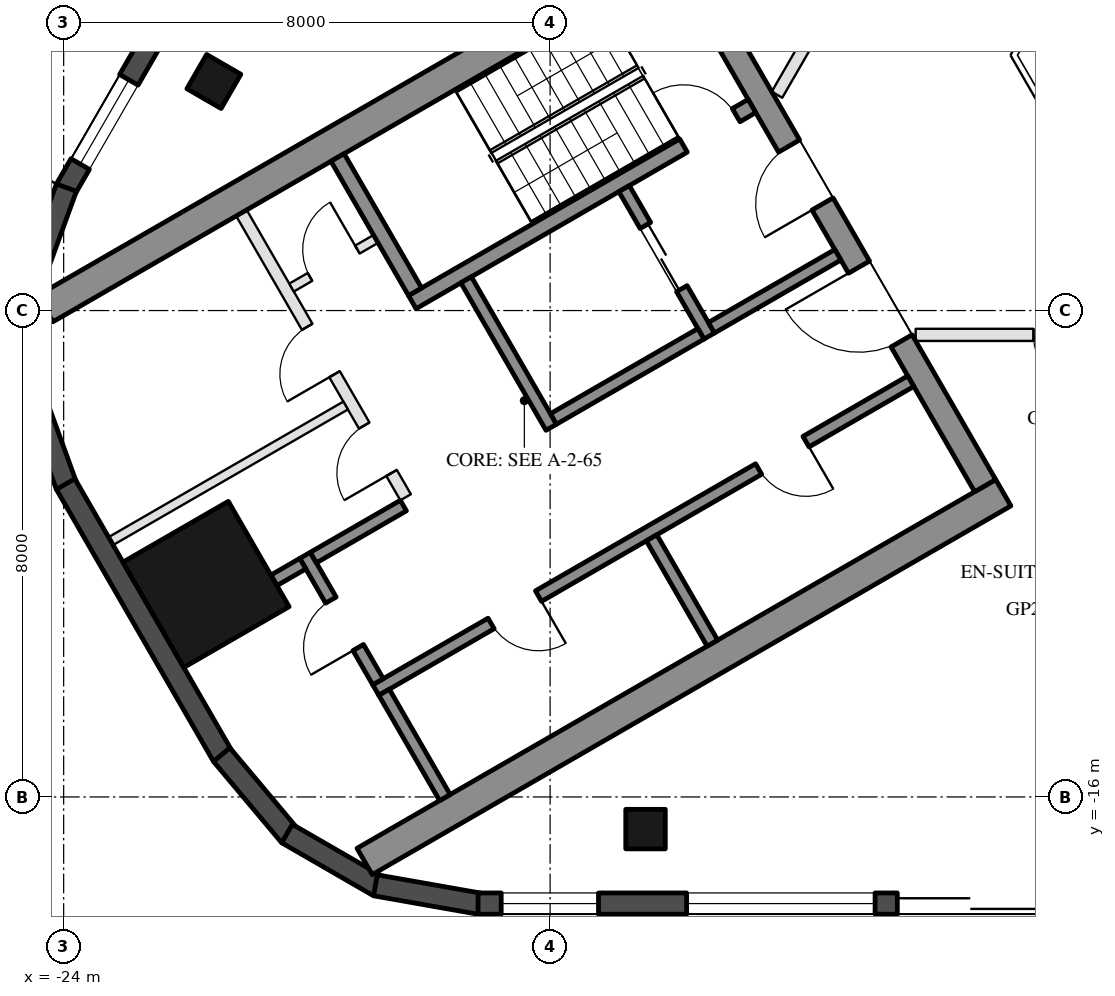
"""IFC4 building model, lengths in metres.
Left out: names, types, materials, properties, quantities, classifications, styles, units other than length and angle.
Written with IfcOpenShell. Run it as: python <this file> out.ifc"""

import sys

from ifc_helpers import new_model, si_unit, direction, frame, frame_2d, origin, origin_2d, place, context, subcontext, project, spatial, rectangle, hollow_rectangle, extrude, boolean, halfspace, element, fill, save


model = new_model("IFC4")
c1 = context("Model", 3, precision=1e-05, world=origin(), true_north=direction((0.0, 1.0)))
c2 = subcontext(c1, "Body", "Model", "MODEL_VIEW")
j1 = project(units=[si_unit("LENGTHUNIT", "METRE"), si_unit("PLANEANGLEUNIT", "RADIAN")], contexts=[c1])
p1 = place(None, origin())
s1 = spatial("IfcSite", under=j1, at=p1, CompositionType="ELEMENT")
p2 = place(p1, origin())
s2 = spatial("IfcBuilding", under=s1, at=p2, CompositionType="ELEMENT")
p3 = place(p2, frame((0.0, 0.0, 280.0)))
s3 = spatial("IfcBuildingStorey", under=s2, at=p3, CompositionType="ELEMENT", Elevation=280.0)
for number, where, z_axis, x_axis in (
    (1, (-14.431, -16.529, 0.0), (0.0, 0.0, 1.0), (-1.0, 0.0, 0.0)),
    (2, (-21.53, -4.233, 0.0), (0.0, 0.0, 1.0), (0.5, 0.866, 0.0)),
):
    element("IfcColumn", number, at=place(p3, frame(where, z_axis=z_axis, x_axis=x_axis)), inside=s3, PredefinedType="COLUMN", context=c2, shape_type="SweptSolid", body=[
        boolean("DIFFERENCE", extrude(hollow_rectangle(XDim=0.65, YDim=0.65, WallThickness=0.03, at=origin_2d()), origin(), (0.0, 0.0, 1.0), 3.7), halfspace(frame((0.0, 0.0, 0.047), z_axis=(0.0, 0.0, 1.0), x_axis=(1.0, 0.0, 0.0)), True)),
    ])
p4 = place(p3, frame((-21.658, -12.504, 0.0), z_axis=(0.0, 0.0, 1.0), x_axis=(-0.5, 0.866025403784, 0.0)))
e3 = element("IfcColumn", 3, at=p4, inside=s3, PredefinedType="COLUMN", context=c2, shape_type="SweptSolid", body=[
    boolean("DIFFERENCE", extrude(hollow_rectangle(XDim=2.0, YDim=2.0, WallThickness=0.05, at=origin_2d()), origin(), (0.0, 0.0, 1.0), 3.7), halfspace(frame((0.0, 0.0, 0.113), z_axis=(0.0, 0.0, 1.0), x_axis=(1.0, 0.0, 0.0)), True)),
])
p5 = place(p3, frame((-22.14, -2.841, 0.0), z_axis=(0.0, 0.0, 1.0), x_axis=(-0.500040506767, -0.866002015928, 0.0)))
e4 = element("IfcWall", 4, at=p5, inside=s3, PredefinedType="SOLIDWALL", context=c2, shape_type="SweptSolid", body=[
    extrude(rectangle(XDim=3.655, YDim=0.35, at=frame_2d((1.827, 0.0))), origin(), (0.0, 0.0, 1.0), 3.55),
])
p6 = place(p5, frame((1.575, 0.0, 0.3)))
e5 = element("IfcOpeningElement", 5, at=p6, cuts=e4, PredefinedType="OPENING", context=c2, shape_type="SweptSolid", body=[
    extrude(rectangle(XDim=1.6, YDim=2.65, at=frame_2d((0.8, 1.325))), frame((0.0, 0.185, 0.0), z_axis=(0.0, -1.0, 0.0), x_axis=(1.0, 0.0, 0.0)), (0.0, 0.0, 1.0), 0.37),
])
for number, where, z_axis, x_axis in (
    (6, (-23.955, -5.978, 0.0), (0.0, 0.0, 1.0), (-0.342, -0.94, 0.0)),
    (7, (-24.552, -9.242, 0.0), (0.0, 0.0, 1.0), (0.342, -0.94, 0.0)),
):
    element("IfcWall", number, at=place(p3, frame(where, z_axis=z_axis, x_axis=x_axis)), inside=s3, PredefinedType="SOLIDWALL", context=c2, shape_type="SweptSolid", body=[
        extrude(rectangle(XDim=1.745, YDim=0.35, at=frame_2d((0.872, 0.0))), origin(), (0.0, 0.0, 1.0), 3.55),
    ])
p7 = place(p3, frame((-23.968, -10.854, 0.0), z_axis=(0.0, 0.0, 1.0), x_axis=(0.500020983425, -0.866013288659, 0.0)))
e8 = element("IfcWall", 8, at=p7, inside=s3, PredefinedType="SOLIDWALL", context=c2, shape_type="SweptSolid", body=[
    extrude(rectangle(XDim=5.168, YDim=0.35, at=frame_2d((2.584, 0.0))), origin(), (0.0, 0.0, 1.0), 3.55),
])
for number, where, z_axis, x_axis in (
    (9, (-21.401, -15.305, 0.0), (0.0, 0.0, 1.0), (0.643, -0.766, 0.0)),
    (10, (-20.327, -16.602, 0.0), (0.0, 0.0, 1.0), (0.866, -0.5, 0.0)),
    (11, (-18.873, -17.453, 0.0), (0.0, 0.0, 1.0), (0.985, -0.174, 0.0)),
):
    element("IfcWall", number, at=place(p3, frame(where, z_axis=z_axis, x_axis=x_axis)), inside=s3, PredefinedType="SOLIDWALL", context=c2, shape_type="SweptSolid", body=[
        extrude(rectangle(XDim=1.745, YDim=0.35, at=frame_2d((0.872, 0.0))), origin(), (0.0, 0.0, 1.0), 3.55),
    ])
p8 = place(p3, frame((-17.185, -17.754, 0.0), z_axis=(0.0, 0.0, 1.0), x_axis=(1.0, 0.0, 0.0)))
e12 = element("IfcWall", 12, at=p8, inside=s3, PredefinedType="SOLIDWALL", context=c2, shape_type="SweptSolid", body=[
    extrude(rectangle(XDim=10.87, YDim=0.35, at=frame_2d((5.435, 0.0))), origin(), (0.0, 0.0, 1.0), 3.55),
])
p9 = place(p8, frame((0.381, 0.0, 0.3)))
e13 = element("IfcOpeningElement", 13, at=p9, cuts=e12, PredefinedType="OPENING", context=c2, shape_type="SweptSolid", body=[
    extrude(rectangle(XDim=1.6, YDim=2.65, at=frame_2d((0.8, 1.325))), frame((0.0, 0.185, 0.0), z_axis=(0.0, -1.0, 0.0), x_axis=(1.0, 0.0, 0.0)), (0.0, 0.0, 1.0), 0.37),
])
p10 = place(p8, frame((6.895, 0.0, 0.0)))
e14 = element("IfcOpeningElement", 14, at=p10, cuts=e12, PredefinedType="OPENING", context=c2, shape_type="SweptSolid", body=[
    extrude(rectangle(XDim=2.4, YDim=2.4, at=frame_2d((1.2, 1.2))), frame((0.0, 0.185, 0.0), z_axis=(0.0, -1.0, 0.0), x_axis=(1.0, 0.0, 0.0)), (0.0, 0.0, 1.0), 0.37),
])
p11 = place(p8, frame((3.43, 0.0, 0.3)))
e15 = element("IfcOpeningElement", 15, at=p11, cuts=e12, PredefinedType="OPENING", context=c2, shape_type="SweptSolid", body=[
    extrude(rectangle(XDim=3.1, YDim=2.65, at=frame_2d((1.55, 1.325))), frame((0.0, 0.185, 0.0), z_axis=(0.0, -1.0, 0.0), x_axis=(1.0, 0.0, 0.0)), (0.0, 0.0, 1.0), 0.37),
])
for number, where, z_axis, x_axis in (
    (16, (-13.797, -1.903, 0.0), (0.0, 0.0, 1.0), (-0.866, -0.5, 0.0)),
    (17, (-8.547, -10.997, 0.0), (0.0, 0.0, 1.0), (-0.866, -0.5, 0.0)),
):
    element("IfcWall", number, at=place(p3, frame(where, z_axis=z_axis, x_axis=x_axis)), inside=s3, PredefinedType="SHEAR", context=c2, shape_type="SweptSolid", body=[
        extrude(rectangle(XDim=12.129, YDim=0.5, at=frame_2d((6.064, 0.0))), origin(), (0.0, 0.0, 1.0), 3.5),
    ])
p12 = place(p3, frame((-13.845, -2.22, 0.0), z_axis=(0.0, 0.0, 1.0), x_axis=(0.500004234368, -0.866022959057, 0.0)))
e18 = element("IfcWall", 18, at=p12, inside=s3, PredefinedType="SHEAR", context=c2, shape_type="SweptSolid", body=[
    extrude(rectangle(XDim=10.0, YDim=0.4, at=frame_2d((5.0, 0.0))), origin(), (0.0, 0.0, 1.0), 3.5),
])
p13 = place(p12, frame((3.55, 0.0, 0.0)))
e19 = element("IfcOpeningElement", 19, at=p13, cuts=e18, PredefinedType="OPENING", context=c2, shape_type="SweptSolid", body=[
    extrude(rectangle(XDim=1.1, YDim=2.1, at=frame_2d((0.55, 1.05))), frame((0.0, 0.21, 0.0), z_axis=(0.0, -1.0, 0.0), x_axis=(1.0, 0.0, 0.0)), (0.0, 0.0, 1.0), 0.42),
])
p14 = place(p12, frame((5.85, 0.0, 0.0)))
e20 = element("IfcOpeningElement", 20, at=p14, cuts=e18, PredefinedType="OPENING", context=c2, shape_type="SweptSolid", body=[
    extrude(rectangle(XDim=1.4, YDim=2.1, at=frame_2d((0.7, 1.05))), frame((0.0, 0.21, 0.0), z_axis=(0.0, -1.0, 0.0), x_axis=(1.0, 0.0, 0.0)), (0.0, 0.0, 1.0), 0.42),
])
p15 = place(p3, frame((-12.681, -4.636, 0.0), z_axis=(0.0, 0.0, 1.0), x_axis=(-0.866021702275, -0.500006411147, 0.0)))
e21 = element("IfcWall", 21, at=p15, inside=s3, PredefinedType="SHEAR", context=c2, shape_type="SweptSolid", body=[
    extrude(rectangle(XDim=6.45, YDim=0.25, at=frame_2d((3.225, 0.0))), origin(), (0.0, 0.0, 1.0), 3.5),
])
p16 = place(p15, frame((0.3, 0.0, 0.0)))
e22 = element("IfcOpeningElement", 22, at=p16, cuts=e21, PredefinedType="OPENING", context=c2, shape_type="SweptSolid", body=[
    extrude(rectangle(XDim=1.0, YDim=2.1, at=frame_2d((0.5, 1.05))), frame((0.0, 0.135, 0.0), z_axis=(0.0, -1.0, 0.0), x_axis=(1.0, 0.0, 0.0)), (0.0, 0.0, 1.0), 0.27),
])
p17 = place(p3, frame((-19.496, -5.482, 0.0), z_axis=(0.0, 0.0, 1.0), x_axis=(0.499990435942, -0.866030925526, 0.0)))
e23 = element("IfcWall", 23, at=p17, inside=s3, PredefinedType="SHEAR", context=c2, shape_type="SweptSolid", body=[
    extrude(rectangle(XDim=2.55, YDim=0.25, at=frame_2d((1.275, 0.0))), origin(), (0.0, 0.0, 1.0), 3.5),
])
p18 = place(p3, frame((-17.381, -7.495, 0.0), z_axis=(0.0, 0.0, 1.0), x_axis=(0.500011755427, -0.866018616679, 0.0)))
e24 = element("IfcWall", 24, at=p18, inside=s3, PredefinedType="SHEAR", context=c2, shape_type="SweptSolid", body=[
    extrude(rectangle(XDim=2.8, YDim=0.2, at=frame_2d((1.4, 0.0))), origin(), (0.0, 0.0, 1.0), 3.5),
])
p19 = place(p3, frame((-14.783, -5.995, 0.0), z_axis=(0.0, 0.0, 1.0), x_axis=(0.49994636267, -0.866056369097, 0.0)))
e25 = element("IfcWall", 25, at=p19, inside=s3, PredefinedType="SHEAR", context=c2, shape_type="SweptSolid", body=[
    extrude(rectangle(XDim=2.8, YDim=0.2, at=frame_2d((1.4, 0.0))), origin(), (0.0, 0.0, 1.0), 3.5),
])
p20 = place(p19, frame((0.7, 0.0, 0.0)))
e26 = element("IfcOpeningElement", 26, at=p20, cuts=e25, PredefinedType="OPENING", context=c2, shape_type="SweptSolid", body=[
    extrude(rectangle(XDim=1.2, YDim=2.1, at=frame_2d((0.6, 1.05))), frame((0.0, 0.11, 0.0), z_axis=(0.0, -1.0, 0.0), x_axis=(1.0, 0.0, 0.0)), (0.0, 0.0, 1.0), 0.22),
])
p21 = place(p3, frame((-13.52, -8.383, 0.0), z_axis=(0.0, 0.0, 1.0), x_axis=(-0.866034573852, -0.49998411664, 0.0)))
e27 = element("IfcWall", 27, at=p21, inside=s3, PredefinedType="SHEAR", context=c2, shape_type="SweptSolid", body=[
    extrude(rectangle(XDim=2.8, YDim=0.2, at=frame_2d((1.4, 0.0))), origin(), (0.0, 0.0, 1.0), 3.5),
])
p22 = place(p3, frame((-11.268, -7.083, 0.0), z_axis=(0.0, 0.0, 1.0), x_axis=(-0.866050077142, -0.499957262057, 0.0)))
e28 = element("IfcWall", 28, at=p22, inside=s3, PredefinedType="SHEAR", context=c2, shape_type="SweptSolid", body=[
    extrude(rectangle(XDim=2.4, YDim=0.2, at=frame_2d((1.2, 0.0))), origin(), (0.0, 0.0, 1.0), 3.5),
])
p23 = place(p3, frame((-10.068, -9.162, 0.0), z_axis=(0.0, 0.0, 1.0), x_axis=(-0.866032725843, -0.499987317609, 0.0)))
e29 = element("IfcWall", 29, at=p23, inside=s3, PredefinedType="SHEAR", context=c2, shape_type="SweptSolid", body=[
    extrude(rectangle(XDim=10.16, YDim=0.2, at=frame_2d((5.08, 0.0))), origin(), (0.0, 0.0, 1.0), 3.5),
])
p24 = place(p23, frame((1.99, 0.0, 0.0)))
e30 = element("IfcOpeningElement", 30, at=p24, cuts=e29, PredefinedType="OPENING", context=c2, shape_type="SweptSolid", body=[
    extrude(rectangle(XDim=0.9, YDim=2.1, at=frame_2d((0.45, 1.05))), frame((0.0, 0.11, 0.0), z_axis=(0.0, -1.0, 0.0), x_axis=(1.0, 0.0, 0.0)), (0.0, 0.0, 1.0), 0.22),
])
p25 = place(p23, frame((7.07, 0.0, 0.0)))
e31 = element("IfcOpeningElement", 31, at=p25, cuts=e29, PredefinedType="OPENING", context=c2, shape_type="SweptSolid", body=[
    extrude(rectangle(XDim=0.9, YDim=2.1, at=frame_2d((0.45, 1.05))), frame((0.0, 0.11, 0.0), z_axis=(0.0, -1.0, 0.0), x_axis=(1.0, 0.0, 0.0)), (0.0, 0.0, 1.0), 0.22),
])
p26 = place(p3, frame((-20.031, -12.026, 0.0), z_axis=(0.0, 0.0, 1.0), x_axis=(0.500033551112, -0.866006032174, 0.0)))
e32 = element("IfcWall", 32, at=p26, inside=s3, PredefinedType="SHEAR", context=c2, shape_type="SweptSolid", body=[
    extrude(rectangle(XDim=2.4, YDim=0.2, at=frame_2d((1.2, 0.0))), origin(), (0.0, 0.0, 1.0), 3.5),
])
p27 = place(p26, frame((0.85, 0.0, 0.0)))
e33 = element("IfcOpeningElement", 33, at=p27, cuts=e32, PredefinedType="OPENING", context=c2, shape_type="SweptSolid", body=[
    extrude(rectangle(XDim=0.9, YDim=2.1, at=frame_2d((0.45, 1.05))), frame((0.0, 0.11, 0.0), z_axis=(0.0, -1.0, 0.0), x_axis=(1.0, 0.0, 0.0)), (0.0, 0.0, 1.0), 0.22),
])
p28 = place(p3, frame((-18.413, -11.208, 0.0), z_axis=(0.0, 0.0, 1.0), x_axis=(-0.866038183914, -0.499977863513, 0.0)))
e34 = element("IfcWall", 34, at=p28, inside=s3, PredefinedType="SHEAR", context=c2, shape_type="SweptSolid", body=[
    extrude(rectangle(XDim=1.71, YDim=0.2, at=frame_2d((0.855, 0.0))), origin(), (0.0, 0.0, 1.0), 3.5),
])
for number, where, z_axis, x_axis in (
    (35, (-14.331, -11.738, 0.0), (0.0, 0.0, 1.0), (0.5, -0.866, 0.0)),
    (36, (-18.73, -14.278, 0.0), (0.0, 0.0, 1.0), (0.5, -0.866, 0.0)),
):
    element("IfcWall", number, at=place(p3, frame(where, z_axis=z_axis, x_axis=x_axis)), inside=s3, PredefinedType="SHEAR", context=c2, shape_type="SweptSolid", body=[
        extrude(rectangle(XDim=2.0, YDim=0.2, at=frame_2d((1.0, 0.0))), origin(), (0.0, 0.0, 1.0), 3.5),
    ])
p29 = place(p3, frame((-20.067, -12.163, 0.0), z_axis=(0.0, 0.0, 1.0), x_axis=(-0.866044851585, -0.499966313909, 0.0)))
e37 = element("IfcWall", 37, at=p29, inside=s3, PredefinedType="SHEAR", context=c2, shape_type="SweptSolid", body=[
    extrude(rectangle(XDim=0.549, YDim=0.2, at=frame_2d((0.274, 0.0))), origin(), (0.0, 0.0, 1.0), 3.5),
])
p30 = place(p3, frame((-21.076, -6.395, 0.0), z_axis=(0.0, 0.0, 1.0), x_axis=(0.50001468107, -0.866016927499, 0.0)))
e38 = element("IfcWall", 38, at=p30, inside=s3, PredefinedType="PARTITIONING", context=c2, shape_type="SweptSolid", body=[
    extrude(rectangle(XDim=5.4, YDim=0.2, at=frame_2d((2.7, 0.0))), origin(), (0.0, 0.0, 1.0), 3.5),
])
p31 = place(p30, frame((2.163, 0.0, 0.0)))
e39 = element("IfcOpeningElement", 39, at=p31, cuts=e38, PredefinedType="OPENING", context=c2, shape_type="SweptSolid", body=[
    extrude(rectangle(XDim=0.9, YDim=2.1, at=frame_2d((0.45, 1.05))), frame((0.0, 0.11, 0.0), z_axis=(0.0, -1.0, 0.0), x_axis=(1.0, 0.0, 0.0)), (0.0, 0.0, 1.0), 0.22),
])
p32 = place(p30, frame((4.038, 0.0, 0.0)))
e40 = element("IfcOpeningElement", 40, at=p32, cuts=e38, PredefinedType="OPENING", context=c2, shape_type="SweptSolid", body=[
    extrude(rectangle(XDim=0.9, YDim=2.1, at=frame_2d((0.45, 1.05))), frame((0.0, 0.11, 0.0), z_axis=(0.0, -1.0, 0.0), x_axis=(1.0, 0.0, 0.0)), (0.0, 0.0, 1.0), 0.22),
])
p33 = place(p3, frame((-18.866, -6.822, 0.0), z_axis=(0.0, 0.0, 1.0), x_axis=(-0.866028054938, -0.499995408039, 0.0)))
e41 = element("IfcWall", 41, at=p33, inside=s3, PredefinedType="PARTITIONING", context=c2, shape_type="SweptSolid", body=[
    extrude(rectangle(XDim=1.6, YDim=0.15, at=frame_2d((0.8, 0.0))), origin(), (0.0, 0.0, 1.0), 3.5),
])
p34 = place(p33, frame((0.35, 0.0, 0.0)))
e42 = element("IfcOpeningElement", 42, at=p34, cuts=e41, PredefinedType="OPENING", context=c2, shape_type="SweptSolid", body=[
    extrude(rectangle(XDim=0.9, YDim=2.1, at=frame_2d((0.45, 1.05))), frame((0.0, 0.085, 0.0), z_axis=(0.0, -1.0, 0.0), x_axis=(1.0, 0.0, 0.0)), (0.0, 0.0, 1.0), 0.17),
])
p35 = place(p3, frame((-19.363, -9.562, 0.0), z_axis=(0.0, 0.0, 1.0), x_axis=(-0.866024199568, -0.500002085759, 0.0)))
e43 = element("IfcWall", 43, at=p35, inside=s3, PredefinedType="PARTITIONING", context=c2, shape_type="SweptSolid", body=[
    extrude(rectangle(XDim=4.459, YDim=0.15, at=frame_2d((2.229, 0.0))), origin(), (0.0, 0.0, 1.0), 3.5),
])
p36 = place(p3, frame((-5.0, -8.4, 0.0), z_axis=(0.0, 0.0, 1.0), x_axis=(-1.0, 0.0, 0.0)))
e44 = element("IfcWall", 44, at=p36, inside=s3, PredefinedType="PARTITIONING", context=c2, shape_type="SweptSolid", body=[
    extrude(rectangle(XDim=4.988, YDim=0.2, at=frame_2d((2.494, 0.0))), origin(), (0.0, 0.0, 1.0), 3.05),
])
p37 = place(p36, frame((2.05, 0.0, 0.0)))
e45 = element("IfcOpeningElement", 45, at=p37, cuts=e44, PredefinedType="OPENING", context=c2, shape_type="SweptSolid", body=[
    extrude(rectangle(XDim=1.0, YDim=2.1, at=frame_2d((0.5, 1.05))), frame((0.0, 0.11, 0.0), z_axis=(0.0, -1.0, 0.0), x_axis=(1.0, 0.0, 0.0)), (0.0, 0.0, 1.0), 0.22),
])
p38 = place(p3, frame((-12.269, -4.45, 0.0), z_axis=(0.0, 0.0, 1.0), x_axis=(0.500000040646, 0.866025380318, 0.0)))
e46 = element("IfcWall", 46, at=p38, inside=s3, PredefinedType="PARTITIONING", context=c2, shape_type="SweptSolid", body=[
    extrude(rectangle(XDim=3.781, YDim=0.2, at=frame_2d((1.891, 0.0))), origin(), (0.0, 0.0, 1.0), 3.05),
])
p39 = place(p38, frame((1.391, 0.0, 0.0)))
e47 = element("IfcOpeningElement", 47, at=p39, cuts=e46, PredefinedType="OPENING", context=c2, shape_type="SweptSolid", body=[
    extrude(rectangle(XDim=1.0, YDim=2.1, at=frame_2d((0.5, 1.05))), frame((0.0, 0.11, 0.0), z_axis=(0.0, -1.0, 0.0), x_axis=(1.0, 0.0, 0.0)), (0.0, 0.0, 1.0), 0.22),
])
p40 = place(p9, origin())
e48 = element("IfcWindow", 48, at=p40, inside=s3, PartitioningType="SINGLE_PANEL", PredefinedType="WINDOW", context=c2, shape_type="SweptSolid", body=[
    extrude(rectangle(XDim=1.6, YDim=2.65, at=frame_2d((0.8, 1.325))), frame((0.0, 0.03, 0.0), z_axis=(0.0, -1.0, 0.0), x_axis=(1.0, 0.0, 0.0)), (0.0, 0.0, 1.0), 0.06),
])
fill(e13, e48)
p41 = place(p10, frame((2.4, 0.0, 0.0), z_axis=(0.0, 0.0, 1.0), x_axis=(-1.0, 0.0, 0.0)))
e49 = element("IfcDoor", 49, at=p41, inside=s3, OperationType="SLIDING_TO_LEFT", PredefinedType="DOOR", context=c2, shape_type="SweptSolid", body=[
    extrude(rectangle(XDim=2.4, YDim=2.4, at=frame_2d((1.2, 1.2))), frame((0.0, 0.025, 0.0), z_axis=(0.0, -1.0, 0.0), x_axis=(1.0, 0.0, 0.0)), (0.0, 0.0, 1.0), 0.05),
])
fill(e14, e49)
p42 = place(p11, origin())
e50 = element("IfcWindow", 50, at=p42, inside=s3, PartitioningType="SINGLE_PANEL", PredefinedType="WINDOW", context=c2, shape_type="SweptSolid", body=[
    extrude(rectangle(XDim=3.1, YDim=2.65, at=frame_2d((1.55, 1.325))), frame((0.0, 0.03, 0.0), z_axis=(0.0, -1.0, 0.0), x_axis=(1.0, 0.0, 0.0)), (0.0, 0.0, 1.0), 0.06),
])
fill(e15, e50)
p43 = place(p6, origin())
e51 = element("IfcWindow", 51, at=p43, inside=s3, PartitioningType="SINGLE_PANEL", PredefinedType="WINDOW", context=c2, shape_type="SweptSolid", body=[
    extrude(rectangle(XDim=1.6, YDim=2.65, at=frame_2d((0.8, 1.325))), frame((0.0, 0.03, 0.0), z_axis=(0.0, -1.0, 0.0), x_axis=(1.0, 0.0, 0.0)), (0.0, 0.0, 1.0), 0.06),
])
fill(e5, e51)
p44 = place(p20, origin())
e52 = element("IfcDoor", 52, at=p44, inside=s3, OperationType="DOUBLE_DOOR_SLIDING", PredefinedType="DOOR", context=c2, shape_type="SweptSolid", body=[
    extrude(rectangle(XDim=1.2, YDim=2.1, at=frame_2d((0.6, 1.05))), frame((0.0, 0.025, 0.0), z_axis=(0.0, -1.0, 0.0), x_axis=(1.0, 0.0, 0.0)), (0.0, 0.0, 1.0), 0.05),
])
fill(e26, e52)
p45 = place(p34, frame((0.9, 0.0, 0.0), z_axis=(0.0, 0.0, 1.0), x_axis=(-1.0, 0.0, 0.0)))
e53 = element("IfcDoor", 53, at=p45, inside=s3, OperationType="SINGLE_SWING_RIGHT", PredefinedType="DOOR", context=c2, shape_type="SweptSolid", body=[
    extrude(rectangle(XDim=0.9, YDim=2.1, at=frame_2d((0.45, 1.05))), frame((0.0, 0.025, 0.0), z_axis=(0.0, -1.0, 0.0), x_axis=(1.0, 0.0, 0.0)), (0.0, 0.0, 1.0), 0.05),
])
fill(e42, e53)
p46 = place(p24, origin())
e54 = element("IfcDoor", 54, at=p46, inside=s3, OperationType="SINGLE_SWING_LEFT", PredefinedType="DOOR", context=c2, shape_type="SweptSolid", body=[
    extrude(rectangle(XDim=0.9, YDim=2.1, at=frame_2d((0.45, 1.05))), frame((0.0, 0.025, 0.0), z_axis=(0.0, -1.0, 0.0), x_axis=(1.0, 0.0, 0.0)), (0.0, 0.0, 1.0), 0.05),
])
fill(e30, e54)
p47 = place(p25, origin())
e55 = element("IfcDoor", 55, at=p47, inside=s3, OperationType="SINGLE_SWING_LEFT", PredefinedType="DOOR", context=c2, shape_type="SweptSolid", body=[
    extrude(rectangle(XDim=0.9, YDim=2.1, at=frame_2d((0.45, 1.05))), frame((0.0, 0.025, 0.0), z_axis=(0.0, -1.0, 0.0), x_axis=(1.0, 0.0, 0.0)), (0.0, 0.0, 1.0), 0.05),
])
fill(e31, e55)
p48 = place(p27, frame((0.9, 0.0, 0.0), z_axis=(0.0, 0.0, 1.0), x_axis=(-1.0, 0.0, 0.0)))
e56 = element("IfcDoor", 56, at=p48, inside=s3, OperationType="SINGLE_SWING_LEFT", PredefinedType="DOOR", context=c2, shape_type="SweptSolid", body=[
    extrude(rectangle(XDim=0.9, YDim=2.1, at=frame_2d((0.45, 1.05))), frame((0.0, 0.025, 0.0), z_axis=(0.0, -1.0, 0.0), x_axis=(1.0, 0.0, 0.0)), (0.0, 0.0, 1.0), 0.05),
])
fill(e33, e56)
p49 = place(p31, frame((0.9, 0.0, 0.0), z_axis=(0.0, 0.0, 1.0), x_axis=(-1.0, 0.0, 0.0)))
e57 = element("IfcDoor", 57, at=p49, inside=s3, OperationType="SINGLE_SWING_LEFT", PredefinedType="DOOR", context=c2, shape_type="SweptSolid", body=[
    extrude(rectangle(XDim=0.9, YDim=2.1, at=frame_2d((0.45, 1.05))), frame((0.0, 0.025, 0.0), z_axis=(0.0, -1.0, 0.0), x_axis=(1.0, 0.0, 0.0)), (0.0, 0.0, 1.0), 0.05),
])
fill(e39, e57)
p50 = place(p32, frame((0.9, 0.0, 0.0), z_axis=(0.0, 0.0, 1.0), x_axis=(-1.0, 0.0, 0.0)))
e58 = element("IfcDoor", 58, at=p50, inside=s3, OperationType="SINGLE_SWING_LEFT", PredefinedType="DOOR", context=c2, shape_type="SweptSolid", body=[
    extrude(rectangle(XDim=0.9, YDim=2.1, at=frame_2d((0.45, 1.05))), frame((0.0, 0.025, 0.0), z_axis=(0.0, -1.0, 0.0), x_axis=(1.0, 0.0, 0.0)), (0.0, 0.0, 1.0), 0.05),
])
fill(e40, e58)
p51 = place(p13, frame((1.1, 0.0, 0.0), z_axis=(0.0, 0.0, 1.0), x_axis=(-1.0, 0.0, 0.0)))
e59 = element("IfcDoor", 59, at=p51, inside=s3, OperationType="SINGLE_SWING_LEFT", PredefinedType="DOOR", context=c2, shape_type="SweptSolid", body=[
    extrude(rectangle(XDim=1.1, YDim=2.1, at=frame_2d((0.55, 1.05))), frame((0.0, 0.025, 0.0), z_axis=(0.0, -1.0, 0.0), x_axis=(1.0, 0.0, 0.0)), (0.0, 0.0, 1.0), 0.05),
])
fill(e19, e59)
p52 = place(p14, frame((1.4, 0.0, 0.0), z_axis=(0.0, 0.0, 1.0), x_axis=(-1.0, 0.0, 0.0)))
e60 = element("IfcDoor", 60, at=p52, inside=s3, OperationType="DOUBLE_DOOR_SINGLE_SWING", PredefinedType="DOOR", context=c2, shape_type="SweptSolid", body=[
    extrude(rectangle(XDim=1.4, YDim=2.1, at=frame_2d((0.7, 1.05))), frame((0.0, 0.025, 0.0), z_axis=(0.0, -1.0, 0.0), x_axis=(1.0, 0.0, 0.0)), (0.0, 0.0, 1.0), 0.05),
])
fill(e20, e60)
p53 = place(p16, frame((1.0, 0.0, 0.0), z_axis=(0.0, 0.0, 1.0), x_axis=(-1.0, 0.0, 0.0)))
e61 = element("IfcDoor", 61, at=p53, inside=s3, OperationType="SINGLE_SWING_LEFT", PredefinedType="DOOR", context=c2, shape_type="SweptSolid", body=[
    extrude(rectangle(XDim=1.0, YDim=2.1, at=frame_2d((0.5, 1.05))), frame((0.0, 0.025, 0.0), z_axis=(0.0, -1.0, 0.0), x_axis=(1.0, 0.0, 0.0)), (0.0, 0.0, 1.0), 0.05),
])
fill(e22, e61)
p54 = place(p37, origin())
e62 = element("IfcDoor", 62, at=p54, inside=s3, OperationType="SINGLE_SWING_LEFT", PredefinedType="DOOR", context=c2, shape_type="SweptSolid", body=[
    extrude(rectangle(XDim=1.0, YDim=2.1, at=frame_2d((0.5, 1.05))), frame((0.0, 0.025, 0.0), z_axis=(0.0, -1.0, 0.0), x_axis=(1.0, 0.0, 0.0)), (0.0, 0.0, 1.0), 0.05),
])
fill(e45, e62)
save(model, sys.argv[1])
